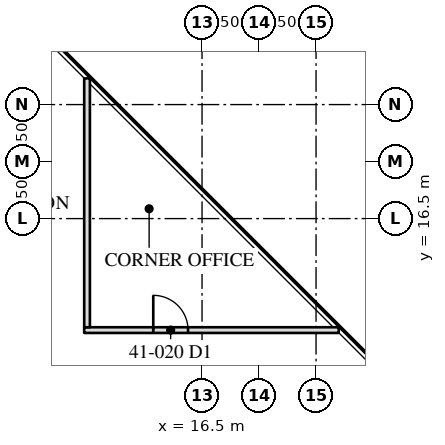
"""IFC4 building model, lengths in metres.
Left out: names, types, materials, properties, quantities, classifications, styles, units other than length and angle.
Written with IfcOpenShell. Run it as: python <this file> out.ifc"""

import sys

from ifc_helpers import new_model, si_unit, direction, frame, frame_2d, origin, place, context, subcontext, project, spatial, rectangle, extrude, element, fill, save


model = new_model("IFC4")
c1 = context("Model", 3, precision=1e-05, world=origin(), true_north=direction((0.0, 1.0)))
c2 = subcontext(c1, "Body", "Model", "MODEL_VIEW")
j1 = project(units=[si_unit("LENGTHUNIT", "METRE"), si_unit("PLANEANGLEUNIT", "RADIAN")], contexts=[c1])
p1 = place(None, origin())
s1 = spatial("IfcSite", under=j1, at=p1, CompositionType="ELEMENT")
p2 = place(p1, origin())
s2 = spatial("IfcBuilding", under=s1, at=p2, CompositionType="ELEMENT")
p3 = place(p2, frame((0.0, 0.0, 174.6)))
s3 = spatial("IfcBuildingStorey", under=s2, at=p3, CompositionType="ELEMENT", Elevation=174.6)
p4 = place(p3, frame((13.399, 13.566, 0.0), z_axis=(0.0, 0.0, 1.0), x_axis=(1.0, 0.0, 0.0)))
e1 = element("IfcWall", 1, at=p4, inside=s3, PredefinedType="PARTITIONING", context=c2, shape_type="SweptSolid", body=[
    extrude(rectangle(XDim=6.698, YDim=0.15, at=frame_2d((3.349, 0.0))), origin(), (0.0, 0.0, 1.0), 3.91),
])
p5 = place(p4, frame((1.817, 0.0, 0.0)))
e2 = element("IfcOpeningElement", 2, at=p5, cuts=e1, PredefinedType="OPENING", context=c2, shape_type="SweptSolid", body=[
    extrude(rectangle(XDim=0.915, YDim=2.134, at=frame_2d((0.458, 1.067))), frame((0.0, 0.085, 0.0), z_axis=(0.0, -1.0, 0.0), x_axis=(1.0, 0.0, 0.0)), (0.0, 0.0, 1.0), 0.17),
])
p6 = place(p3, frame((13.474, 13.641, 0.0), z_axis=(0.0, 0.0, 1.0), x_axis=(0.0, 1.0, 0.0)))
e3 = element("IfcWall", 3, at=p6, inside=s3, PredefinedType="PARTITIONING", context=c2, shape_type="SweptSolid", body=[
    extrude(rectangle(XDim=6.548, YDim=0.15, at=frame_2d((3.274, 0.0))), origin(), (0.0, 0.0, 1.0), 3.91),
])
p7 = place(p5, origin())
e4 = element("IfcDoor", 4, at=p7, inside=s3, OperationType="SINGLE_SWING_LEFT", PredefinedType="DOOR", context=c2, shape_type="SweptSolid", body=[
    extrude(rectangle(XDim=0.915, YDim=2.134, at=frame_2d((0.458, 1.067))), frame((0.0, 0.025, 0.0), z_axis=(0.0, -1.0, 0.0), x_axis=(1.0, 0.0, 0.0)), (0.0, 0.0, 1.0), 0.05),
])
fill(e2, e4)
save(model, sys.argv[1])
